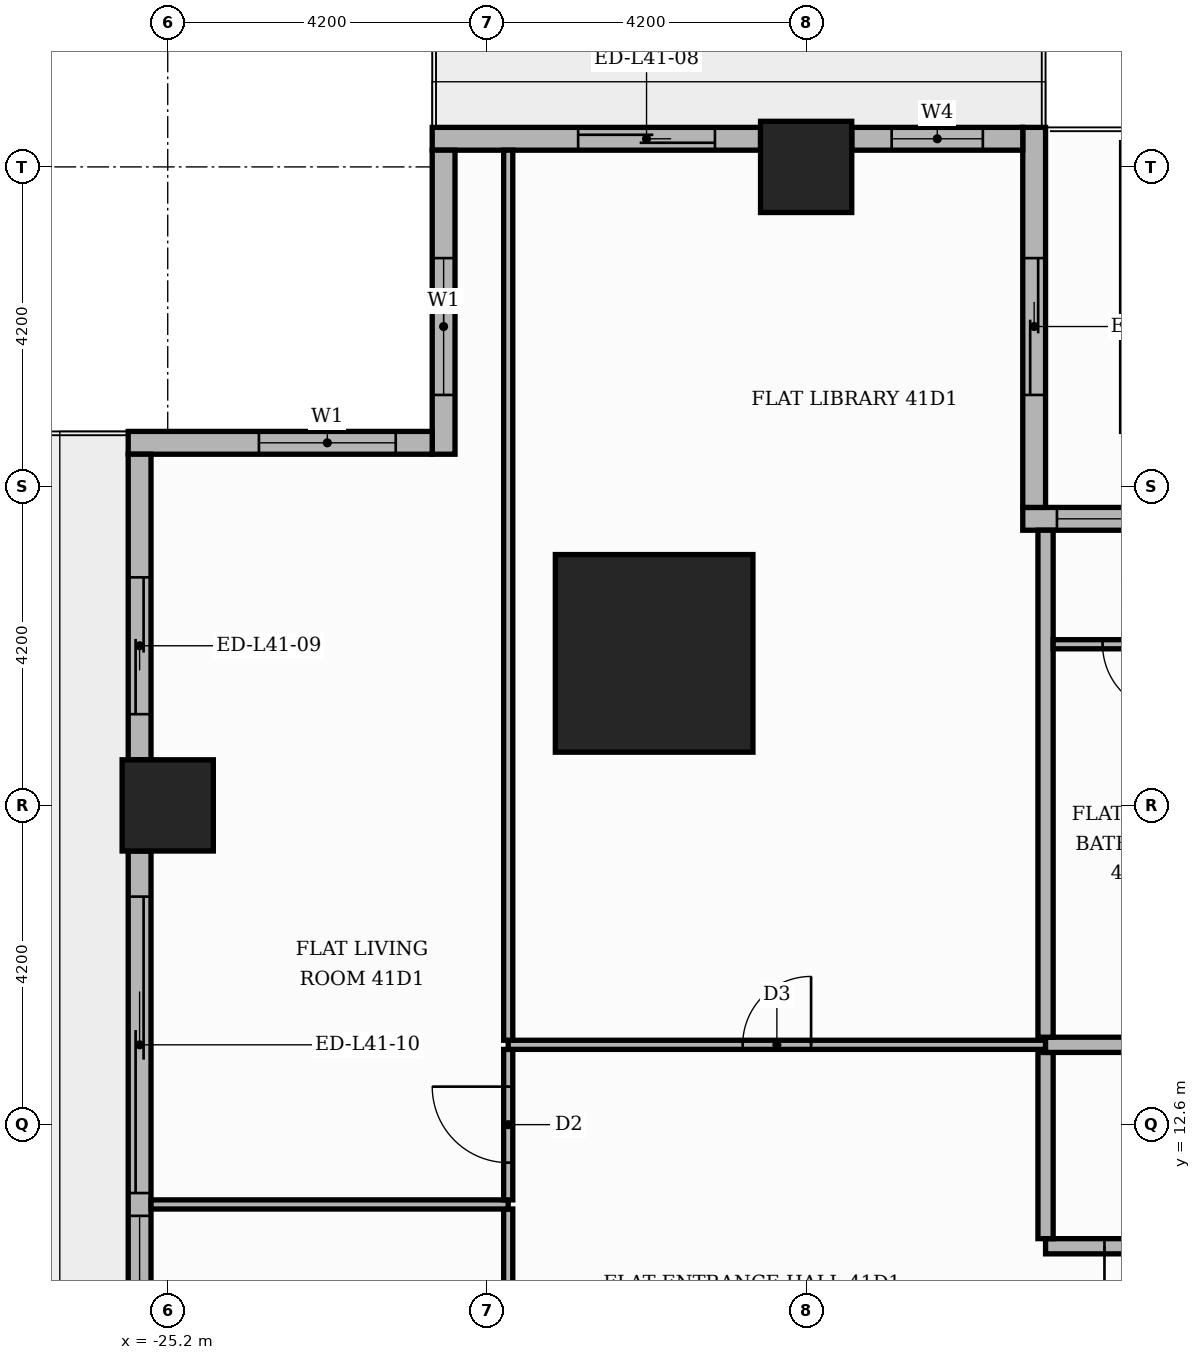
"""IFC4 building model, lengths in metres.
Left out: names, types, materials, properties, quantities, classifications, styles, units other than length and angle.
Written with IfcOpenShell. Run it as: python <this file> out.ifc"""

import sys

from ifc_helpers import new_model, si_unit, direction, frame, frame_2d, origin, origin_2d, place, context, subcontext, project, spatial, rectangle, extrude, element, fill, save


model = new_model("IFC4")
c1 = context("Model", 3, precision=1e-05, world=origin(), true_north=direction((0.0, 1.0)))
c2 = subcontext(c1, "Body", "Model", "MODEL_VIEW")
j1 = project(units=[si_unit("LENGTHUNIT", "METRE"), si_unit("PLANEANGLEUNIT", "RADIAN")], contexts=[c1])
p1 = place(None, origin())
s1 = spatial("IfcSite", under=j1, at=p1, CompositionType="ELEMENT")
p2 = place(p1, origin())
s2 = spatial("IfcBuilding", under=s1, at=p2, CompositionType="ELEMENT")
p3 = place(p2, frame((0.0, 0.0, 172.8)))
s3 = spatial("IfcBuildingStorey", under=s2, at=p3, CompositionType="ELEMENT", Elevation=172.8)
p4 = place(p3, frame((-18.8, 18.8, 0.0), z_axis=(0.0, 0.0, 1.0), x_axis=(1.0, 0.0, 0.0)))
e1 = element("IfcColumn", 1, at=p4, inside=s3, PredefinedType="COLUMN", context=c2, shape_type="SweptSolid", body=[
    extrude(rectangle(XDim=2.6, YDim=2.6, at=origin_2d()), origin(), (0.0, 0.0, 1.0), 3.9),
])
for number, where, z_axis, x_axis in (
    (2, (-16.8, 25.2, 0.0), (0.0, 0.0, 1.0), (1.0, 0.0, 0.0)),
    (3, (-25.2, 16.8, 0.0), (0.0, 0.0, 1.0), (1.0, 0.0, 0.0)),
):
    element("IfcColumn", number, at=place(p3, frame(where, z_axis=z_axis, x_axis=x_axis)), inside=s3, PredefinedType="COLUMN", context=c2, shape_type="SweptSolid", body=[
        extrude(rectangle(XDim=1.2, YDim=1.2, at=origin_2d()), origin(), (0.0, 0.0, 1.0), 3.9),
    ])
p5 = place(p3, frame((13.65, 20.57, 0.0), z_axis=(0.0, 0.0, 1.0), x_axis=(-1.0, 0.0, 0.0)))
e4 = element("IfcWall", 4, at=p5, inside=s3, PredefinedType="STANDARD", context=c2, shape_type="SweptSolid", body=[
    extrude(rectangle(XDim=27.6, YDim=0.3, at=frame_2d((13.8, 0.0))), origin(), (0.0, 0.0, 1.0), 3.48),
])
p6 = place(p5, frame((0.15, 0.0, 0.9)))
e5 = element("IfcOpeningElement", 5, at=p6, cuts=e4, PredefinedType="OPENING", context=c2, shape_type="SweptSolid", body=[
    extrude(rectangle(XDim=1.8, YDim=2.1, at=frame_2d((0.9, 1.05))), frame((0.0, 0.16, 0.0), z_axis=(0.0, -1.0, 0.0), x_axis=(1.0, 0.0, 0.0)), (0.0, 0.0, 1.0), 0.32),
])
p7 = place(p5, frame((2.25, 0.0, 0.9)))
e6 = element("IfcOpeningElement", 6, at=p7, cuts=e4, PredefinedType="OPENING", context=c2, shape_type="SweptSolid", body=[
    extrude(rectangle(XDim=6.0, YDim=2.1, at=frame_2d((3.0, 1.05))), frame((0.0, 0.16, 0.0), z_axis=(0.0, -1.0, 0.0), x_axis=(1.0, 0.0, 0.0)), (0.0, 0.0, 1.0), 0.32),
])
p8 = place(p5, frame((8.55, 0.0, 0.9)))
e7 = element("IfcOpeningElement", 7, at=p8, cuts=e4, PredefinedType="OPENING", context=c2, shape_type="SweptSolid", body=[
    extrude(rectangle(XDim=6.0, YDim=2.1, at=frame_2d((3.0, 1.05))), frame((0.0, 0.16, 0.0), z_axis=(0.0, -1.0, 0.0), x_axis=(1.0, 0.0, 0.0)), (0.0, 0.0, 1.0), 0.32),
])
p9 = place(p5, frame((14.85, 0.0, 0.9)))
e8 = element("IfcOpeningElement", 8, at=p9, cuts=e4, PredefinedType="OPENING", context=c2, shape_type="SweptSolid", body=[
    extrude(rectangle(XDim=6.0, YDim=2.1, at=frame_2d((3.0, 1.05))), frame((0.0, 0.16, 0.0), z_axis=(0.0, -1.0, 0.0), x_axis=(1.0, 0.0, 0.0)), (0.0, 0.0, 1.0), 0.32),
])
p10 = place(p5, frame((21.15, 0.0, 0.9)))
e9 = element("IfcOpeningElement", 9, at=p10, cuts=e4, PredefinedType="OPENING", context=c2, shape_type="SweptSolid", body=[
    extrude(rectangle(XDim=6.0, YDim=2.1, at=frame_2d((3.0, 1.05))), frame((0.0, 0.16, 0.0), z_axis=(0.0, -1.0, 0.0), x_axis=(1.0, 0.0, 0.0)), (0.0, 0.0, 1.0), 0.32),
])
p11 = place(p3, frame((-13.8, 20.72, 0.0), z_axis=(0.0, 0.0, 1.0), x_axis=(0.0, 1.0, 0.0)))
e10 = element("IfcWall", 10, at=p11, inside=s3, PredefinedType="STANDARD", context=c2, shape_type="SweptSolid", body=[
    extrude(rectangle(XDim=5.0, YDim=0.3, at=frame_2d((2.5, 0.0))), origin(), (0.0, 0.0, 1.0), 3.48),
])
p12 = place(p11, frame((1.48, 0.0, 0.0)))
e11 = element("IfcOpeningElement", 11, at=p12, cuts=e10, PredefinedType="OPENING", context=c2, shape_type="SweptSolid", body=[
    extrude(rectangle(XDim=1.8, YDim=2.4, at=frame_2d((0.9, 1.2))), frame((0.0, 0.16, 0.0), z_axis=(0.0, -1.0, 0.0), x_axis=(1.0, 0.0, 0.0)), (0.0, 0.0, 1.0), 0.32),
])
p13 = place(p3, frame((-13.95, 25.57, 0.0), z_axis=(0.0, 0.0, 1.0), x_axis=(-1.0, 0.0, 0.0)))
e12 = element("IfcWall", 12, at=p13, inside=s3, PredefinedType="STANDARD", context=c2, shape_type="SweptSolid", body=[
    extrude(rectangle(XDim=2.25, YDim=0.3, at=frame_2d((1.125, 0.0))), origin(), (0.0, 0.0, 1.0), 3.48),
])
p14 = place(p13, frame((0.525, 0.0, 0.9)))
e13 = element("IfcOpeningElement", 13, at=p14, cuts=e12, PredefinedType="OPENING", context=c2, shape_type="SweptSolid", body=[
    extrude(rectangle(XDim=1.2, YDim=2.1, at=frame_2d((0.6, 1.05))), frame((0.0, 0.16, 0.0), z_axis=(0.0, -1.0, 0.0), x_axis=(1.0, 0.0, 0.0)), (0.0, 0.0, 1.0), 0.32),
])
p15 = place(p3, frame((-17.4, 25.57, 0.0), z_axis=(0.0, 0.0, 1.0), x_axis=(-1.0, 0.0, 0.0)))
e14 = element("IfcWall", 14, at=p15, inside=s3, PredefinedType="STANDARD", context=c2, shape_type="SweptSolid", body=[
    extrude(rectangle(XDim=4.32, YDim=0.3, at=frame_2d((2.16, 0.0))), origin(), (0.0, 0.0, 1.0), 3.48),
])
p16 = place(p15, frame((0.6, 0.0, 0.0)))
e15 = element("IfcOpeningElement", 15, at=p16, cuts=e14, PredefinedType="OPENING", context=c2, shape_type="SweptSolid", body=[
    extrude(rectangle(XDim=1.8, YDim=2.4, at=frame_2d((0.9, 1.2))), frame((0.0, 0.16, 0.0), z_axis=(0.0, -1.0, 0.0), x_axis=(1.0, 0.0, 0.0)), (0.0, 0.0, 1.0), 0.32),
])
p17 = place(p3, frame((-21.57, 25.42, 0.0), z_axis=(0.0, 0.0, 1.0), x_axis=(0.0, -1.0, 0.0)))
e16 = element("IfcWall", 16, at=p17, inside=s3, PredefinedType="STANDARD", context=c2, shape_type="SweptSolid", body=[
    extrude(rectangle(XDim=4.0, YDim=0.3, at=frame_2d((2.0, 0.0))), origin(), (0.0, 0.0, 1.0), 3.48),
])
p18 = place(p17, frame((1.42, 0.0, 0.9)))
e17 = element("IfcOpeningElement", 17, at=p18, cuts=e16, PredefinedType="OPENING", context=c2, shape_type="SweptSolid", body=[
    extrude(rectangle(XDim=1.8, YDim=2.1, at=frame_2d((0.9, 1.05))), frame((0.0, 0.16, 0.0), z_axis=(0.0, -1.0, 0.0), x_axis=(1.0, 0.0, 0.0)), (0.0, 0.0, 1.0), 0.32),
])
p19 = place(p3, frame((-21.72, 21.57, 0.0), z_axis=(0.0, 0.0, 1.0), x_axis=(-1.0, 0.0, 0.0)))
e18 = element("IfcWall", 18, at=p19, inside=s3, PredefinedType="STANDARD", context=c2, shape_type="SweptSolid", body=[
    extrude(rectangle(XDim=4.0, YDim=0.3, at=frame_2d((2.0, 0.0))), origin(), (0.0, 0.0, 1.0), 3.48),
])
p20 = place(p19, frame((0.48, 0.0, 0.9)))
e19 = element("IfcOpeningElement", 19, at=p20, cuts=e18, PredefinedType="OPENING", context=c2, shape_type="SweptSolid", body=[
    extrude(rectangle(XDim=1.8, YDim=2.1, at=frame_2d((0.9, 1.05))), frame((0.0, 0.16, 0.0), z_axis=(0.0, -1.0, 0.0), x_axis=(1.0, 0.0, 0.0)), (0.0, 0.0, 1.0), 0.32),
])
p21 = place(p3, frame((-25.57, 21.42, 0.0), z_axis=(0.0, 0.0, 1.0), x_axis=(0.0, -1.0, 0.0)))
e20 = element("IfcWall", 20, at=p21, inside=s3, PredefinedType="STANDARD", context=c2, shape_type="SweptSolid", body=[
    extrude(rectangle(XDim=4.02, YDim=0.3, at=frame_2d((2.01, 0.0))), origin(), (0.0, 0.0, 1.0), 3.48),
])
p22 = place(p21, frame((1.62, 0.0, 0.0)))
e21 = element("IfcOpeningElement", 21, at=p22, cuts=e20, PredefinedType="OPENING", context=c2, shape_type="SweptSolid", body=[
    extrude(rectangle(XDim=1.8, YDim=2.4, at=frame_2d((0.9, 1.2))), frame((0.0, 0.16, 0.0), z_axis=(0.0, -1.0, 0.0), x_axis=(1.0, 0.0, 0.0)), (0.0, 0.0, 1.0), 0.32),
])
p23 = place(p3, frame((-25.57, 16.2, 0.0), z_axis=(0.0, 0.0, 1.0), x_axis=(0.0, -1.0, 0.0)))
e22 = element("IfcWall", 22, at=p23, inside=s3, PredefinedType="STANDARD", context=c2, shape_type="SweptSolid", body=[
    extrude(rectangle(XDim=7.2, YDim=0.3, at=frame_2d((3.6, 0.0))), origin(), (0.0, 0.0, 1.0), 3.48),
])
p24 = place(p23, frame((0.6, 0.0, 0.0)))
e23 = element("IfcOpeningElement", 23, at=p24, cuts=e22, PredefinedType="OPENING", context=c2, shape_type="SweptSolid", body=[
    extrude(rectangle(XDim=3.9, YDim=2.4, at=frame_2d((1.95, 1.2))), frame((0.0, 0.16, 0.0), z_axis=(0.0, -1.0, 0.0), x_axis=(1.0, 0.0, 0.0)), (0.0, 0.0, 1.0), 0.32),
])
p25 = place(p23, frame((4.8, 0.0, 0.9)))
e24 = element("IfcOpeningElement", 24, at=p25, cuts=e22, PredefinedType="OPENING", context=c2, shape_type="SweptSolid", body=[
    extrude(rectangle(XDim=1.8, YDim=2.1, at=frame_2d((0.9, 1.05))), frame((0.0, 0.16, 0.0), z_axis=(0.0, -1.0, 0.0), x_axis=(1.0, 0.0, 0.0)), (0.0, 0.0, 1.0), 0.32),
])
p26 = place(p3, frame((-20.72, 7.41, 0.0), z_axis=(0.0, 0.0, 1.0), x_axis=(0.0, 1.0, 0.0)))
e25 = element("IfcWall", 25, at=p26, inside=s3, PredefinedType="PARTITIONING", context=c2, shape_type="SweptSolid", body=[
    extrude(rectangle(XDim=4.08, YDim=0.12, at=frame_2d((2.04, 0.0))), origin(), (0.0, 0.0, 1.0), 3.48),
])
p27 = place(p26, frame((1.59, 0.0, 0.0)))
e26 = element("IfcOpeningElement", 26, at=p27, cuts=e25, PredefinedType="OPENING", context=c2, shape_type="SweptSolid", body=[
    extrude(rectangle(XDim=0.9, YDim=2.1, at=frame_2d((0.45, 1.05))), frame((0.0, 0.07, 0.0), z_axis=(0.0, -1.0, 0.0), x_axis=(1.0, 0.0, 0.0)), (0.0, 0.0, 1.0), 0.14),
])
p28 = place(p3, frame((-13.65, 11.0, 0.0), z_axis=(0.0, 0.0, 1.0), x_axis=(1.0, 0.0, 0.0)))
e27 = element("IfcWall", 27, at=p28, inside=s3, PredefinedType="PARTITIONING", context=c2, shape_type="SweptSolid", body=[
    extrude(rectangle(XDim=2.65, YDim=0.2, at=frame_2d((1.325, 0.0))), origin(), (0.0, 0.0, 1.0), 3.48),
])
p29 = place(p28, frame((0.775, 0.0, 0.0)))
e28 = element("IfcOpeningElement", 28, at=p29, cuts=e27, PredefinedType="OPENING", context=c2, shape_type="SweptSolid", body=[
    extrude(rectangle(XDim=1.1, YDim=2.4, at=frame_2d((0.55, 1.2))), frame((0.0, 0.11, 0.0), z_axis=(0.0, -1.0, 0.0), x_axis=(1.0, 0.0, 0.0)), (0.0, 0.0, 1.0), 0.22),
])
p30 = place(p3, frame((-13.65, 11.1, 0.0), z_axis=(0.0, 0.0, 1.0), x_axis=(0.0, 1.0, 0.0)))
e29 = element("IfcWall", 29, at=p30, inside=s3, PredefinedType="PARTITIONING", context=c2, shape_type="SweptSolid", body=[
    extrude(rectangle(XDim=2.45, YDim=0.2, at=frame_2d((1.225, 0.0))), origin(), (0.0, 0.0, 1.0), 3.48),
])
p31 = place(p3, frame((-25.42, 11.55, 0.0), z_axis=(0.0, 0.0, 1.0), x_axis=(1.0, 0.0, 0.0)))
e30 = element("IfcWall", 30, at=p31, inside=s3, PredefinedType="PARTITIONING", context=c2, shape_type="SweptSolid", body=[
    extrude(rectangle(XDim=4.7, YDim=0.12, at=frame_2d((2.35, 0.0))), origin(), (0.0, 0.0, 1.0), 3.48),
])
p32 = place(p3, frame((-20.72, 11.61, 0.0), z_axis=(0.0, 0.0, 1.0), x_axis=(0.0, 1.0, 0.0)))
e31 = element("IfcWall", 31, at=p32, inside=s3, PredefinedType="PARTITIONING", context=c2, shape_type="SweptSolid", body=[
    extrude(rectangle(XDim=1.98, YDim=0.12, at=frame_2d((0.99, 0.0))), origin(), (0.0, 0.0, 1.0), 3.48),
])
p33 = place(p32, frame((0.49, 0.0, 0.0)))
e32 = element("IfcOpeningElement", 32, at=p33, cuts=e31, PredefinedType="OPENING", context=c2, shape_type="SweptSolid", body=[
    extrude(rectangle(XDim=1.0, YDim=2.1, at=frame_2d((0.5, 1.05))), frame((0.0, 0.07, 0.0), z_axis=(0.0, -1.0, 0.0), x_axis=(1.0, 0.0, 0.0)), (0.0, 0.0, 1.0), 0.14),
])
p34 = place(p3, frame((-20.72, 13.65, 0.0), z_axis=(0.0, 0.0, 1.0), x_axis=(1.0, 0.0, 0.0)))
e33 = element("IfcWall", 33, at=p34, inside=s3, PredefinedType="PARTITIONING", context=c2, shape_type="SweptSolid", body=[
    extrude(rectangle(XDim=7.07, YDim=0.12, at=frame_2d((3.535, 0.0))), origin(), (0.0, 0.0, 1.0), 3.48),
])
p35 = place(p34, frame((3.085, 0.0, 0.0)))
e34 = element("IfcOpeningElement", 34, at=p35, cuts=e33, PredefinedType="OPENING", context=c2, shape_type="SweptSolid", body=[
    extrude(rectangle(XDim=0.9, YDim=2.1, at=frame_2d((0.45, 1.05))), frame((0.0, 0.07, 0.0), z_axis=(0.0, -1.0, 0.0), x_axis=(1.0, 0.0, 0.0)), (0.0, 0.0, 1.0), 0.14),
])
p36 = place(p3, frame((-13.65, 13.65, 0.0), z_axis=(0.0, 0.0, 1.0), x_axis=(1.0, 0.0, 0.0)))
e35 = element("IfcWall", 35, at=p36, inside=s3, PredefinedType="PARTITIONING", context=c2, shape_type="SweptSolid", body=[
    extrude(rectangle(XDim=39.07, YDim=0.2, at=frame_2d((19.535, 0.0))), origin(), (0.0, 0.0, 1.0), 3.48),
])
p37 = place(p36, frame((23.6, 0.0, 0.0)))
e36 = element("IfcOpeningElement", 36, at=p37, cuts=e35, PredefinedType="OPENING", context=c2, shape_type="SweptSolid", body=[
    extrude(rectangle(XDim=1.1, YDim=2.4, at=frame_2d((0.55, 1.2))), frame((0.0, 0.11, 0.0), z_axis=(0.0, -1.0, 0.0), x_axis=(1.0, 0.0, 0.0)), (0.0, 0.0, 1.0), 0.22),
])
p38 = place(p3, frame((-20.72, 13.71, 0.0), z_axis=(0.0, 0.0, 1.0), x_axis=(0.0, 1.0, 0.0)))
e37 = element("IfcWall", 37, at=p38, inside=s3, PredefinedType="PARTITIONING", context=c2, shape_type="SweptSolid", body=[
    extrude(rectangle(XDim=11.71, YDim=0.12, at=frame_2d((5.855, 0.0))), origin(), (0.0, 0.0, 1.0), 3.48),
])
p39 = place(p3, frame((-13.65, 13.75, 0.0), z_axis=(0.0, 0.0, 1.0), x_axis=(0.0, 1.0, 0.0)))
e38 = element("IfcWall", 38, at=p39, inside=s3, PredefinedType="PARTITIONING", context=c2, shape_type="SweptSolid", body=[
    extrude(rectangle(XDim=6.67, YDim=0.2, at=frame_2d((3.335, 0.0))), origin(), (0.0, 0.0, 1.0), 3.48),
])
p40 = place(p3, frame((-13.55, 18.92, 0.0), z_axis=(0.0, 0.0, 1.0), x_axis=(1.0, 0.0, 0.0)))
e39 = element("IfcWall", 39, at=p40, inside=s3, PredefinedType="PARTITIONING", context=c2, shape_type="SweptSolid", body=[
    extrude(rectangle(XDim=20.9, YDim=0.12, at=frame_2d((10.45, 0.0))), origin(), (0.0, 0.0, 1.0), 3.48),
])
p41 = place(p40, frame((17.15, 0.0, 0.0)))
e40 = element("IfcOpeningElement", 40, at=p41, cuts=e39, PredefinedType="OPENING", context=c2, shape_type="SweptSolid", body=[
    extrude(rectangle(XDim=0.9, YDim=2.1, at=frame_2d((0.45, 1.05))), frame((0.0, 0.07, 0.0), z_axis=(0.0, -1.0, 0.0), x_axis=(1.0, 0.0, 0.0)), (0.0, 0.0, 1.0), 0.14),
])
p42 = place(p40, frame((12.2, 0.0, 0.0)))
e41 = element("IfcOpeningElement", 41, at=p42, cuts=e39, PredefinedType="OPENING", context=c2, shape_type="SweptSolid", body=[
    extrude(rectangle(XDim=0.9, YDim=2.1, at=frame_2d((0.45, 1.05))), frame((0.0, 0.07, 0.0), z_axis=(0.0, -1.0, 0.0), x_axis=(1.0, 0.0, 0.0)), (0.0, 0.0, 1.0), 0.14),
])
p43 = place(p40, frame((7.1, 0.0, 0.0)))
e42 = element("IfcOpeningElement", 42, at=p43, cuts=e39, PredefinedType="OPENING", context=c2, shape_type="SweptSolid", body=[
    extrude(rectangle(XDim=0.9, YDim=2.1, at=frame_2d((0.45, 1.05))), frame((0.0, 0.07, 0.0), z_axis=(0.0, -1.0, 0.0), x_axis=(1.0, 0.0, 0.0)), (0.0, 0.0, 1.0), 0.14),
])
p44 = place(p40, frame((2.75, 0.0, 0.0)))
e43 = element("IfcOpeningElement", 43, at=p44, cuts=e39, PredefinedType="OPENING", context=c2, shape_type="SweptSolid", body=[
    extrude(rectangle(XDim=0.9, YDim=2.1, at=frame_2d((0.45, 1.05))), frame((0.0, 0.07, 0.0), z_axis=(0.0, -1.0, 0.0), x_axis=(1.0, 0.0, 0.0)), (0.0, 0.0, 1.0), 0.14),
])
p45 = place(p40, frame((0.65, 0.0, 0.0)))
e44 = element("IfcOpeningElement", 44, at=p45, cuts=e39, PredefinedType="OPENING", context=c2, shape_type="SweptSolid", body=[
    extrude(rectangle(XDim=0.9, YDim=2.1, at=frame_2d((0.45, 1.05))), frame((0.0, 0.07, 0.0), z_axis=(0.0, -1.0, 0.0), x_axis=(1.0, 0.0, 0.0)), (0.0, 0.0, 1.0), 0.14),
])
p46 = place(p10, origin())
e45 = element("IfcWindow", 45, at=p46, inside=s3, PartitioningType="SINGLE_PANEL", PredefinedType="WINDOW", context=c2, shape_type="SweptSolid", body=[
    extrude(rectangle(XDim=6.0, YDim=2.1, at=frame_2d((3.0, 1.05))), frame((0.0, 0.03, 0.0), z_axis=(0.0, -1.0, 0.0), x_axis=(1.0, 0.0, 0.0)), (0.0, 0.0, 1.0), 0.06),
])
fill(e9, e45)
p47 = place(p12, origin())
e46 = element("IfcDoor", 46, at=p47, inside=s3, OperationType="SLIDING_TO_RIGHT", PredefinedType="DOOR", context=c2, shape_type="SweptSolid", body=[
    extrude(rectangle(XDim=1.8, YDim=2.4, at=frame_2d((0.9, 1.2))), frame((0.0, 0.025, 0.0), z_axis=(0.0, -1.0, 0.0), x_axis=(1.0, 0.0, 0.0)), (0.0, 0.0, 1.0), 0.05),
])
fill(e11, e46)
p48 = place(p14, origin())
e47 = element("IfcWindow", 47, at=p48, inside=s3, PartitioningType="SINGLE_PANEL", PredefinedType="WINDOW", context=c2, shape_type="SweptSolid", body=[
    extrude(rectangle(XDim=1.2, YDim=2.1, at=frame_2d((0.6, 1.05))), frame((0.0, 0.03, 0.0), z_axis=(0.0, -1.0, 0.0), x_axis=(1.0, 0.0, 0.0)), (0.0, 0.0, 1.0), 0.06),
])
fill(e13, e47)
p49 = place(p16, origin())
e48 = element("IfcDoor", 48, at=p49, inside=s3, OperationType="SLIDING_TO_LEFT", PredefinedType="DOOR", context=c2, shape_type="SweptSolid", body=[
    extrude(rectangle(XDim=1.8, YDim=2.4, at=frame_2d((0.9, 1.2))), frame((0.0, 0.025, 0.0), z_axis=(0.0, -1.0, 0.0), x_axis=(1.0, 0.0, 0.0)), (0.0, 0.0, 1.0), 0.05),
])
fill(e15, e48)
p50 = place(p18, origin())
e49 = element("IfcWindow", 49, at=p50, inside=s3, PartitioningType="SINGLE_PANEL", PredefinedType="WINDOW", context=c2, shape_type="SweptSolid", body=[
    extrude(rectangle(XDim=1.8, YDim=2.1, at=frame_2d((0.9, 1.05))), frame((0.0, 0.03, 0.0), z_axis=(0.0, -1.0, 0.0), x_axis=(1.0, 0.0, 0.0)), (0.0, 0.0, 1.0), 0.06),
])
fill(e17, e49)
p51 = place(p20, origin())
e50 = element("IfcWindow", 50, at=p51, inside=s3, PartitioningType="SINGLE_PANEL", PredefinedType="WINDOW", context=c2, shape_type="SweptSolid", body=[
    extrude(rectangle(XDim=1.8, YDim=2.1, at=frame_2d((0.9, 1.05))), frame((0.0, 0.03, 0.0), z_axis=(0.0, -1.0, 0.0), x_axis=(1.0, 0.0, 0.0)), (0.0, 0.0, 1.0), 0.06),
])
fill(e19, e50)
p52 = place(p22, origin())
e51 = element("IfcDoor", 51, at=p52, inside=s3, OperationType="SLIDING_TO_RIGHT", PredefinedType="DOOR", context=c2, shape_type="SweptSolid", body=[
    extrude(rectangle(XDim=1.8, YDim=2.4, at=frame_2d((0.9, 1.2))), frame((0.0, 0.025, 0.0), z_axis=(0.0, -1.0, 0.0), x_axis=(1.0, 0.0, 0.0)), (0.0, 0.0, 1.0), 0.05),
])
fill(e21, e51)
p53 = place(p24, origin())
e52 = element("IfcDoor", 52, at=p53, inside=s3, OperationType="SLIDING_TO_LEFT", PredefinedType="DOOR", context=c2, shape_type="SweptSolid", body=[
    extrude(rectangle(XDim=3.9, YDim=2.4, at=frame_2d((1.95, 1.2))), frame((0.0, 0.025, 0.0), z_axis=(0.0, -1.0, 0.0), x_axis=(1.0, 0.0, 0.0)), (0.0, 0.0, 1.0), 0.05),
])
fill(e23, e52)
p54 = place(p25, origin())
e53 = element("IfcWindow", 53, at=p54, inside=s3, PartitioningType="SINGLE_PANEL", PredefinedType="WINDOW", context=c2, shape_type="SweptSolid", body=[
    extrude(rectangle(XDim=1.8, YDim=2.1, at=frame_2d((0.9, 1.05))), frame((0.0, 0.03, 0.0), z_axis=(0.0, -1.0, 0.0), x_axis=(1.0, 0.0, 0.0)), (0.0, 0.0, 1.0), 0.06),
])
fill(e24, e53)
p55 = place(p45, frame((0.9, 0.0, 0.0), z_axis=(0.0, 0.0, 1.0), x_axis=(-1.0, 0.0, 0.0)))
e54 = element("IfcDoor", 54, at=p55, inside=s3, OperationType="SINGLE_SWING_RIGHT", PredefinedType="DOOR", context=c2, shape_type="SweptSolid", body=[
    extrude(rectangle(XDim=0.9, YDim=2.1, at=frame_2d((0.45, 1.05))), frame((0.0, 0.025, 0.0), z_axis=(0.0, -1.0, 0.0), x_axis=(1.0, 0.0, 0.0)), (0.0, 0.0, 1.0), 0.05),
])
fill(e44, e54)
p56 = place(p29, frame((1.1, 0.0, 0.0), z_axis=(0.0, 0.0, 1.0), x_axis=(-1.0, 0.0, 0.0)))
e55 = element("IfcDoor", 55, at=p56, inside=s3, OperationType="SINGLE_SWING_LEFT", PredefinedType="DOOR", context=c2, shape_type="SweptSolid", body=[
    extrude(rectangle(XDim=1.1, YDim=2.4, at=frame_2d((0.55, 1.2))), frame((0.0, 0.025, 0.0), z_axis=(0.0, -1.0, 0.0), x_axis=(1.0, 0.0, 0.0)), (0.0, 0.0, 1.0), 0.05),
])
fill(e28, e55)
p57 = place(p35, origin())
e56 = element("IfcDoor", 56, at=p57, inside=s3, OperationType="SINGLE_SWING_RIGHT", PredefinedType="DOOR", context=c2, shape_type="SweptSolid", body=[
    extrude(rectangle(XDim=0.9, YDim=2.1, at=frame_2d((0.45, 1.05))), frame((0.0, 0.025, 0.0), z_axis=(0.0, -1.0, 0.0), x_axis=(1.0, 0.0, 0.0)), (0.0, 0.0, 1.0), 0.05),
])
fill(e34, e56)
p58 = place(p33, origin())
e57 = element("IfcDoor", 57, at=p58, inside=s3, OperationType="SINGLE_SWING_RIGHT", PredefinedType="DOOR", context=c2, shape_type="SweptSolid", body=[
    extrude(rectangle(XDim=1.0, YDim=2.1, at=frame_2d((0.5, 1.05))), frame((0.0, 0.025, 0.0), z_axis=(0.0, -1.0, 0.0), x_axis=(1.0, 0.0, 0.0)), (0.0, 0.0, 1.0), 0.05),
])
fill(e32, e57)
save(model, sys.argv[1])
